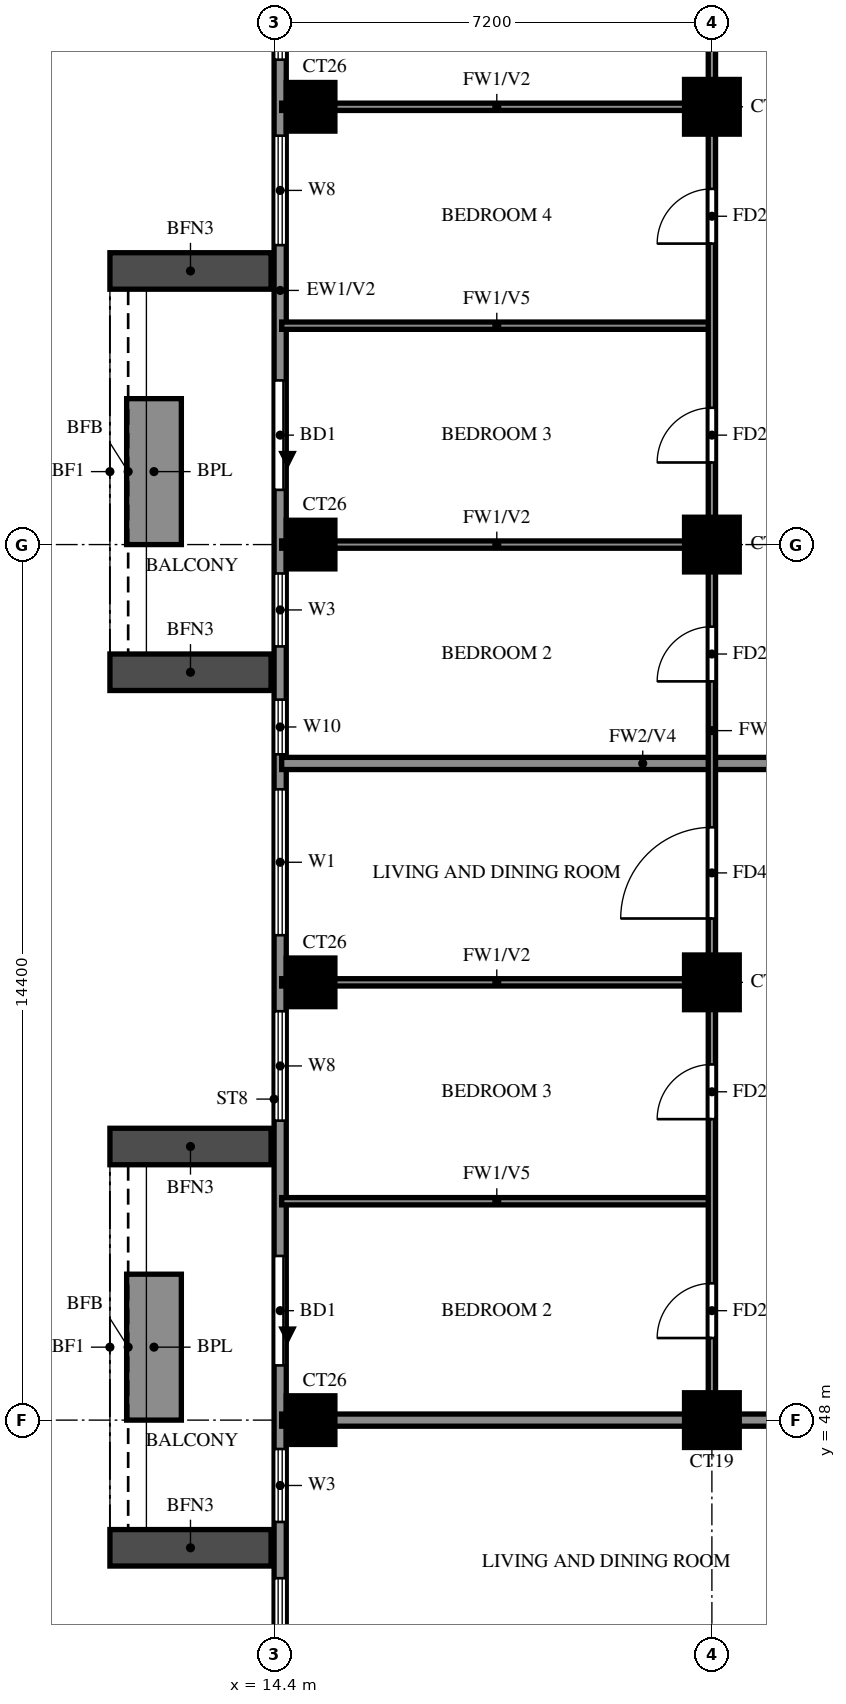
"""IFC4 building model, lengths in metres.
Left out: names, types, materials, properties, quantities, classifications, styles, units other than length and angle.
Written with IfcOpenShell. Run it as: python <this file> out.ifc"""

import sys

from ifc_helpers import new_model, si_unit, direction, frame, frame_2d, origin, origin_2d, place, context, subcontext, project, spatial, rectangle, extrude, source, transform, mapped, element, fill, save


model = new_model("IFC4")
c1 = context("Model", 3, precision=1e-05, world=origin(), true_north=direction((0.0, 1.0)))
c2 = subcontext(c1, "Body", "Model", "MODEL_VIEW")
j1 = project(units=[si_unit("LENGTHUNIT", "METRE"), si_unit("PLANEANGLEUNIT", "RADIAN")], contexts=[c1])
p1 = place(None, origin())
s1 = spatial("IfcSite", under=j1, at=p1, CompositionType="ELEMENT")
p2 = place(p1, origin())
s2 = spatial("IfcBuilding", under=s1, at=p2, CompositionType="ELEMENT")
p3 = place(p2, frame((0.0, 0.0, 192.0)))
s3 = spatial("IfcBuildingStorey", under=s2, at=p3, CompositionType="ELEMENT", Elevation=192.0)
m1 = source(origin(), c2, "Body", "SweptSolid", [
    extrude(rectangle(XDim=0.8, YDim=0.8, at=origin_2d()), origin(), (0.0, 0.0, 1.0), 3.2),
])
p4 = place(p3, frame((15.0, 48.0, 0.0), z_axis=(0.0, 0.0, 1.0), x_axis=(1.0, 0.0, 0.0)))
e1 = element("IfcColumn", 1, at=p4, inside=s3, PredefinedType="COLUMN", context=c2, shape_type="MappedRepresentation", body=[
    mapped(m1, transform((0.0, 0.0, 0.0))),
])
m2 = source(origin(), c2, "Body", "SweptSolid", [
    extrude(rectangle(XDim=0.9, YDim=0.9, at=origin_2d()), origin(), (0.0, 0.0, 1.0), 3.2),
])
p5 = place(p3, frame((21.6, 48.0, 0.0), z_axis=(0.0, 0.0, 1.0), x_axis=(1.0, 0.0, 0.0)))
e2 = element("IfcColumn", 2, at=p5, inside=s3, PredefinedType="COLUMN", context=c2, shape_type="MappedRepresentation", body=[
    mapped(m2, transform((0.0, 0.0, 0.0))),
])
p6 = place(p3, frame((15.0, 55.2, 0.0), z_axis=(0.0, 0.0, 1.0), x_axis=(1.0, 0.0, 0.0)))
e3 = element("IfcColumn", 3, at=p6, inside=s3, PredefinedType="COLUMN", context=c2, shape_type="MappedRepresentation", body=[
    mapped(m1, transform((0.0, 0.0, 0.0))),
])
p7 = place(p3, frame((21.6, 55.2, 0.0), z_axis=(0.0, 0.0, 1.0), x_axis=(1.0, 0.0, 0.0)))
e4 = element("IfcColumn", 4, at=p7, inside=s3, PredefinedType="COLUMN", context=c2, shape_type="MappedRepresentation", body=[
    mapped(m2, transform((0.0, 0.0, 0.0))),
])
p8 = place(p3, frame((15.0, 62.4, 0.0), z_axis=(0.0, 0.0, 1.0), x_axis=(1.0, 0.0, 0.0)))
e5 = element("IfcColumn", 5, at=p8, inside=s3, PredefinedType="COLUMN", context=c2, shape_type="MappedRepresentation", body=[
    mapped(m1, transform((0.0, 0.0, 0.0))),
])
p9 = place(p3, frame((21.6, 62.4, 0.0), z_axis=(0.0, 0.0, 1.0), x_axis=(1.0, 0.0, 0.0)))
e6 = element("IfcColumn", 6, at=p9, inside=s3, PredefinedType="COLUMN", context=c2, shape_type="MappedRepresentation", body=[
    mapped(m2, transform((0.0, 0.0, 0.0))),
])
p10 = place(p3, frame((15.0, 69.6, 0.0), z_axis=(0.0, 0.0, 1.0), x_axis=(1.0, 0.0, 0.0)))
e7 = element("IfcColumn", 7, at=p10, inside=s3, PredefinedType="COLUMN", context=c2, shape_type="MappedRepresentation", body=[
    mapped(m1, transform((0.0, 0.0, 0.0))),
])
p11 = place(p3, frame((21.6, 69.6, 0.0), z_axis=(0.0, 0.0, 1.0), x_axis=(1.0, 0.0, 0.0)))
e8 = element("IfcColumn", 8, at=p11, inside=s3, PredefinedType="COLUMN", context=c2, shape_type="MappedRepresentation", body=[
    mapped(m2, transform((0.0, 0.0, 0.0))),
])
p12 = place(p3, frame((14.5, 76.6, 0.0), z_axis=(0.0, 0.0, 1.0), x_axis=(0.0, -1.0, 0.0)))
e9 = element("IfcWall", 9, at=p12, inside=s3, PredefinedType="SOLIDWALL", context=c2, shape_type="SweptSolid", body=[
    extrude(rectangle(XDim=33.4, YDim=0.2, at=frame_2d((16.7, 0.0))), origin(), (0.0, 0.0, 1.0), 3.2),
])
p13 = place(p12, frame((11.5, 0.0, 0.0)))
e10 = element("IfcOpeningElement", 10, at=p13, cuts=e9, PredefinedType="OPENING", context=c2, shape_type="SweptSolid", body=[
    extrude(rectangle(XDim=1.8, YDim=2.4, at=frame_2d((0.9, 1.2))), frame((0.0, 0.11, 0.0), z_axis=(0.0, -1.0, 0.0), x_axis=(1.0, 0.0, 0.0)), (0.0, 0.0, 1.0), 0.22),
])
p14 = place(p12, frame((25.9, 0.0, 0.0)))
e11 = element("IfcOpeningElement", 11, at=p14, cuts=e9, PredefinedType="OPENING", context=c2, shape_type="SweptSolid", body=[
    extrude(rectangle(XDim=1.8, YDim=2.4, at=frame_2d((0.9, 1.2))), frame((0.0, 0.11, 0.0), z_axis=(0.0, -1.0, 0.0), x_axis=(1.0, 0.0, 0.0)), (0.0, 0.0, 1.0), 0.22),
])
p15 = place(p12, frame((29.075, 0.0, 0.6)))
e12 = element("IfcOpeningElement", 12, at=p15, cuts=e9, PredefinedType="OPENING", context=c2, shape_type="SweptSolid", body=[
    extrude(rectangle(XDim=1.2, YDim=2.4, at=frame_2d((0.6, 1.2))), frame((0.0, 0.11, 0.0), z_axis=(0.0, -1.0, 0.0), x_axis=(1.0, 0.0, 0.0)), (0.0, 0.0, 1.0), 0.22),
])
p16 = place(p12, frame((31.2, 0.0, 0.6)))
e13 = element("IfcOpeningElement", 13, at=p16, cuts=e9, PredefinedType="OPENING", context=c2, shape_type="SweptSolid", body=[
    extrude(rectangle(XDim=1.8, YDim=2.4, at=frame_2d((0.9, 1.2))), frame((0.0, 0.11, 0.0), z_axis=(0.0, -1.0, 0.0), x_axis=(1.0, 0.0, 0.0)), (0.0, 0.0, 1.0), 0.22),
])
p17 = place(p12, frame((21.875, 0.0, 0.6)))
e14 = element("IfcOpeningElement", 14, at=p17, cuts=e9, PredefinedType="OPENING", context=c2, shape_type="SweptSolid", body=[
    extrude(rectangle(XDim=1.8, YDim=2.4, at=frame_2d((0.9, 1.2))), frame((0.0, 0.11, 0.0), z_axis=(0.0, -1.0, 0.0), x_axis=(1.0, 0.0, 0.0)), (0.0, 0.0, 1.0), 0.22),
])
p18 = place(p12, frame((18.225, 0.0, 0.6)))
e15 = element("IfcOpeningElement", 15, at=p18, cuts=e9, PredefinedType="OPENING", context=c2, shape_type="SweptSolid", body=[
    extrude(rectangle(XDim=2.4, YDim=2.4, at=frame_2d((1.2, 1.2))), frame((0.0, 0.11, 0.0), z_axis=(0.0, -1.0, 0.0), x_axis=(1.0, 0.0, 0.0)), (0.0, 0.0, 1.0), 0.22),
])
p19 = place(p12, frame((14.675, 0.0, 0.6)))
e16 = element("IfcOpeningElement", 16, at=p19, cuts=e9, PredefinedType="OPENING", context=c2, shape_type="SweptSolid", body=[
    extrude(rectangle(XDim=1.2, YDim=2.4, at=frame_2d((0.6, 1.2))), frame((0.0, 0.11, 0.0), z_axis=(0.0, -1.0, 0.0), x_axis=(1.0, 0.0, 0.0)), (0.0, 0.0, 1.0), 0.22),
])
p20 = place(p12, frame((16.75, 0.0, 0.6)))
e17 = element("IfcOpeningElement", 17, at=p20, cuts=e9, PredefinedType="OPENING", context=c2, shape_type="SweptSolid", body=[
    extrude(rectangle(XDim=0.9, YDim=2.4, at=frame_2d((0.45, 1.2))), frame((0.0, 0.11, 0.0), z_axis=(0.0, -1.0, 0.0), x_axis=(1.0, 0.0, 0.0)), (0.0, 0.0, 1.0), 0.22),
])
p21 = place(p12, frame((7.475, 0.0, 0.6)))
e18 = element("IfcOpeningElement", 18, at=p21, cuts=e9, PredefinedType="OPENING", context=c2, shape_type="SweptSolid", body=[
    extrude(rectangle(XDim=1.8, YDim=2.4, at=frame_2d((0.9, 1.2))), frame((0.0, 0.11, 0.0), z_axis=(0.0, -1.0, 0.0), x_axis=(1.0, 0.0, 0.0)), (0.0, 0.0, 1.0), 0.22),
])
p22 = place(p12, frame((3.825, 0.0, 0.6)))
e19 = element("IfcOpeningElement", 19, at=p22, cuts=e9, PredefinedType="OPENING", context=c2, shape_type="SweptSolid", body=[
    extrude(rectangle(XDim=2.4, YDim=2.4, at=frame_2d((1.2, 1.2))), frame((0.0, 0.11, 0.0), z_axis=(0.0, -1.0, 0.0), x_axis=(1.0, 0.0, 0.0)), (0.0, 0.0, 1.0), 0.22),
])
p23 = place(p12, frame((0.6, 0.0, 0.6)))
e20 = element("IfcOpeningElement", 20, at=p23, cuts=e9, PredefinedType="OPENING", context=c2, shape_type="SweptSolid", body=[
    extrude(rectangle(XDim=2.4, YDim=2.4, at=frame_2d((1.2, 1.2))), frame((0.0, 0.11, 0.0), z_axis=(0.0, -1.0, 0.0), x_axis=(1.0, 0.0, 0.0)), (0.0, 0.0, 1.0), 0.22),
])
for number, where, z_axis, x_axis in (
    (21, (14.35, 66.9, 0.0), (0.0, 0.0, 1.0), (-1.0, 0.0, 0.0)),
    (22, (14.35, 60.3, 0.0), (0.0, 0.0, 1.0), (-1.0, 0.0, 0.0)),
):
    element("IfcWall", number, at=place(p3, frame(where, z_axis=z_axis, x_axis=x_axis)), inside=s3, PredefinedType="SOLIDWALL", context=c2, shape_type="SweptSolid", body=[
        extrude(rectangle(XDim=2.65, YDim=0.6, at=frame_2d((1.325, 0.0))), origin(), (0.0, 0.0, 1.0), 2.85),
    ])
p24 = place(p3, frame((12.425, 64.8, 0.0), z_axis=(0.0, 0.0, 1.0), x_axis=(0.0, -1.0, 0.0)))
e23 = element("IfcWall", 23, at=p24, inside=s3, PredefinedType="SOLIDWALL", context=c2, shape_type="SweptSolid", body=[
    extrude(rectangle(XDim=2.4, YDim=0.9, at=frame_2d((1.2, 0.0))), origin(), (0.0, 0.0, 1.0), 0.9),
])
for number, where, z_axis, x_axis in (
    (24, (14.35, 52.5, 0.0), (0.0, 0.0, 1.0), (-1.0, 0.0, 0.0)),
    (25, (14.35, 45.9, 0.0), (0.0, 0.0, 1.0), (-1.0, 0.0, 0.0)),
):
    element("IfcWall", number, at=place(p3, frame(where, z_axis=z_axis, x_axis=x_axis)), inside=s3, PredefinedType="SOLIDWALL", context=c2, shape_type="SweptSolid", body=[
        extrude(rectangle(XDim=2.65, YDim=0.6, at=frame_2d((1.325, 0.0))), origin(), (0.0, 0.0, 1.0), 2.85),
    ])
p25 = place(p3, frame((12.425, 50.4, 0.0), z_axis=(0.0, 0.0, 1.0), x_axis=(0.0, -1.0, 0.0)))
e26 = element("IfcWall", 26, at=p25, inside=s3, PredefinedType="SOLIDWALL", context=c2, shape_type="SweptSolid", body=[
    extrude(rectangle(XDim=2.4, YDim=0.9, at=frame_2d((1.2, 0.0))), origin(), (0.0, 0.0, 1.0), 0.9),
])
p26 = place(p3, frame((14.525, 48.0, 0.0), z_axis=(0.0, 0.0, 1.0), x_axis=(1.0, 0.0, 0.0)))
e27 = element("IfcWall", 27, at=p26, inside=s3, PredefinedType="SOLIDWALL", context=c2, shape_type="SweptSolid", body=[
    extrude(rectangle(XDim=19.075, YDim=0.2, at=frame_2d((9.538, 0.0))), origin(), (0.0, 0.0, 1.0), 3.2),
])
p27 = place(p3, frame((14.525, 58.8, 0.0), z_axis=(0.0, 0.0, 1.0), x_axis=(1.0, 0.0, 0.0)))
e28 = element("IfcWall", 28, at=p27, inside=s3, PredefinedType="SOLIDWALL", context=c2, shape_type="SweptSolid", body=[
    extrude(rectangle(XDim=11.875, YDim=0.2, at=frame_2d((5.938, 0.0))), origin(), (0.0, 0.0, 1.0), 2.3),
])
p28 = place(p3, frame((14.525, 51.6, 0.0), z_axis=(0.0, 0.0, 1.0), x_axis=(1.0, 0.0, 0.0)))
e29 = element("IfcWall", 29, at=p28, inside=s3, PredefinedType="PARTITIONING", context=c2, shape_type="SweptSolid", body=[
    extrude(rectangle(XDim=7.075, YDim=0.12, at=frame_2d((3.538, 0.0))), origin(), (0.0, 0.0, 1.0), 2.3),
])
for number, where, z_axis, x_axis in (
    (30, (14.525, 55.2, 0.0), (0.0, 0.0, 1.0), (1.0, 0.0, 0.0)),
    (31, (14.525, 62.4, 0.0), (0.0, 0.0, 1.0), (1.0, 0.0, 0.0)),
):
    element("IfcWall", number, at=place(p3, frame(where, z_axis=z_axis, x_axis=x_axis)), inside=s3, PredefinedType="PARTITIONING", context=c2, shape_type="SweptSolid", body=[
        extrude(rectangle(XDim=7.075, YDim=0.12, at=frame_2d((3.538, 0.0))), origin(), (0.0, 0.0, 1.0), 3.2),
    ])
p29 = place(p3, frame((14.525, 66.0, 0.0), z_axis=(0.0, 0.0, 1.0), x_axis=(1.0, 0.0, 0.0)))
e32 = element("IfcWall", 32, at=p29, inside=s3, PredefinedType="PARTITIONING", context=c2, shape_type="SweptSolid", body=[
    extrude(rectangle(XDim=7.075, YDim=0.12, at=frame_2d((3.538, 0.0))), origin(), (0.0, 0.0, 1.0), 2.3),
])
p30 = place(p3, frame((14.525, 69.6, 0.0), z_axis=(0.0, 0.0, 1.0), x_axis=(1.0, 0.0, 0.0)))
e33 = element("IfcWall", 33, at=p30, inside=s3, PredefinedType="PARTITIONING", context=c2, shape_type="SweptSolid", body=[
    extrude(rectangle(XDim=7.075, YDim=0.12, at=frame_2d((3.538, 0.0))), origin(), (0.0, 0.0, 1.0), 3.2),
])
p31 = place(p3, frame((21.6, 48.0, 0.0), z_axis=(0.0, 0.0, 1.0), x_axis=(0.0, 1.0, 0.0)))
e34 = element("IfcWall", 34, at=p31, inside=s3, PredefinedType="PARTITIONING", context=c2, shape_type="SweptSolid", body=[
    extrude(rectangle(XDim=25.2, YDim=0.12, at=frame_2d((12.6, 0.0))), origin(), (0.0, 0.0, 1.0), 3.2),
])
p32 = place(p31, frame((1.35, 0.0, 0.0)))
e35 = element("IfcOpeningElement", 35, at=p32, cuts=e34, PredefinedType="OPENING", context=c2, shape_type="SweptSolid", body=[
    extrude(rectangle(XDim=0.9, YDim=2.1, at=frame_2d((0.45, 1.05))), frame((0.0, 0.07, 0.0), z_axis=(0.0, -1.0, 0.0), x_axis=(1.0, 0.0, 0.0)), (0.0, 0.0, 1.0), 0.14),
])
p33 = place(p31, frame((4.95, 0.0, 0.0)))
e36 = element("IfcOpeningElement", 36, at=p33, cuts=e34, PredefinedType="OPENING", context=c2, shape_type="SweptSolid", body=[
    extrude(rectangle(XDim=0.9, YDim=2.1, at=frame_2d((0.45, 1.05))), frame((0.0, 0.07, 0.0), z_axis=(0.0, -1.0, 0.0), x_axis=(1.0, 0.0, 0.0)), (0.0, 0.0, 1.0), 0.14),
])
p34 = place(p31, frame((8.25, 0.0, 0.0)))
e37 = element("IfcOpeningElement", 37, at=p34, cuts=e34, PredefinedType="OPENING", context=c2, shape_type="SweptSolid", body=[
    extrude(rectangle(XDim=1.5, YDim=2.1, at=frame_2d((0.75, 1.05))), frame((0.0, 0.07, 0.0), z_axis=(0.0, -1.0, 0.0), x_axis=(1.0, 0.0, 0.0)), (0.0, 0.0, 1.0), 0.14),
])
p35 = place(p31, frame((12.15, 0.0, 0.0)))
e38 = element("IfcOpeningElement", 38, at=p35, cuts=e34, PredefinedType="OPENING", context=c2, shape_type="SweptSolid", body=[
    extrude(rectangle(XDim=0.9, YDim=2.1, at=frame_2d((0.45, 1.05))), frame((0.0, 0.07, 0.0), z_axis=(0.0, -1.0, 0.0), x_axis=(1.0, 0.0, 0.0)), (0.0, 0.0, 1.0), 0.14),
])
p36 = place(p31, frame((15.75, 0.0, 0.0)))
e39 = element("IfcOpeningElement", 39, at=p36, cuts=e34, PredefinedType="OPENING", context=c2, shape_type="SweptSolid", body=[
    extrude(rectangle(XDim=0.9, YDim=2.1, at=frame_2d((0.45, 1.05))), frame((0.0, 0.07, 0.0), z_axis=(0.0, -1.0, 0.0), x_axis=(1.0, 0.0, 0.0)), (0.0, 0.0, 1.0), 0.14),
])
p37 = place(p31, frame((19.35, 0.0, 0.0)))
e40 = element("IfcOpeningElement", 40, at=p37, cuts=e34, PredefinedType="OPENING", context=c2, shape_type="SweptSolid", body=[
    extrude(rectangle(XDim=0.9, YDim=2.1, at=frame_2d((0.45, 1.05))), frame((0.0, 0.07, 0.0), z_axis=(0.0, -1.0, 0.0), x_axis=(1.0, 0.0, 0.0)), (0.0, 0.0, 1.0), 0.14),
])
p38 = place(p31, frame((22.95, 0.0, 0.0)))
e41 = element("IfcOpeningElement", 41, at=p38, cuts=e34, PredefinedType="OPENING", context=c2, shape_type="SweptSolid", body=[
    extrude(rectangle(XDim=0.9, YDim=2.1, at=frame_2d((0.45, 1.05))), frame((0.0, 0.07, 0.0), z_axis=(0.0, -1.0, 0.0), x_axis=(1.0, 0.0, 0.0)), (0.0, 0.0, 1.0), 0.14),
])
p39 = place(p13, origin())
e42 = element("IfcDoor", 42, at=p39, inside=s3, OperationType="DOUBLE_DOOR_SLIDING", PredefinedType="DOOR", context=c2, shape_type="SweptSolid", body=[
    extrude(rectangle(XDim=1.8, YDim=2.4, at=frame_2d((0.9, 1.2))), frame((0.0, 0.025, 0.0), z_axis=(0.0, -1.0, 0.0), x_axis=(1.0, 0.0, 0.0)), (0.0, 0.0, 1.0), 0.05),
])
fill(e10, e42)
p40 = place(p14, origin())
e43 = element("IfcDoor", 43, at=p40, inside=s3, OperationType="DOUBLE_DOOR_SLIDING", PredefinedType="DOOR", context=c2, shape_type="SweptSolid", body=[
    extrude(rectangle(XDim=1.8, YDim=2.4, at=frame_2d((0.9, 1.2))), frame((0.0, 0.025, 0.0), z_axis=(0.0, -1.0, 0.0), x_axis=(1.0, 0.0, 0.0)), (0.0, 0.0, 1.0), 0.05),
])
fill(e11, e43)
p41 = place(p15, origin())
e44 = element("IfcWindow", 44, at=p41, inside=s3, PartitioningType="SINGLE_PANEL", PredefinedType="WINDOW", context=c2, shape_type="SweptSolid", body=[
    extrude(rectangle(XDim=1.2, YDim=2.4, at=frame_2d((0.6, 1.2))), frame((0.0, 0.03, 0.0), z_axis=(0.0, -1.0, 0.0), x_axis=(1.0, 0.0, 0.0)), (0.0, 0.0, 1.0), 0.06),
])
fill(e12, e44)
p42 = place(p16, origin())
e45 = element("IfcWindow", 45, at=p42, inside=s3, PartitioningType="DOUBLE_PANEL_VERTICAL", PredefinedType="WINDOW", context=c2, shape_type="SweptSolid", body=[
    extrude(rectangle(XDim=1.8, YDim=2.4, at=frame_2d((0.9, 1.2))), frame((0.0, 0.03, 0.0), z_axis=(0.0, -1.0, 0.0), x_axis=(1.0, 0.0, 0.0)), (0.0, 0.0, 1.0), 0.06),
])
fill(e13, e45)
p43 = place(p17, origin())
e46 = element("IfcWindow", 46, at=p43, inside=s3, PartitioningType="DOUBLE_PANEL_VERTICAL", PredefinedType="WINDOW", context=c2, shape_type="SweptSolid", body=[
    extrude(rectangle(XDim=1.8, YDim=2.4, at=frame_2d((0.9, 1.2))), frame((0.0, 0.03, 0.0), z_axis=(0.0, -1.0, 0.0), x_axis=(1.0, 0.0, 0.0)), (0.0, 0.0, 1.0), 0.06),
])
fill(e14, e46)
p44 = place(p18, origin())
e47 = element("IfcWindow", 47, at=p44, inside=s3, PartitioningType="DOUBLE_PANEL_VERTICAL", PredefinedType="WINDOW", context=c2, shape_type="SweptSolid", body=[
    extrude(rectangle(XDim=2.4, YDim=2.4, at=frame_2d((1.2, 1.2))), frame((0.0, 0.03, 0.0), z_axis=(0.0, -1.0, 0.0), x_axis=(1.0, 0.0, 0.0)), (0.0, 0.0, 1.0), 0.06),
])
fill(e15, e47)
p45 = place(p19, origin())
e48 = element("IfcWindow", 48, at=p45, inside=s3, PartitioningType="SINGLE_PANEL", PredefinedType="WINDOW", context=c2, shape_type="SweptSolid", body=[
    extrude(rectangle(XDim=1.2, YDim=2.4, at=frame_2d((0.6, 1.2))), frame((0.0, 0.03, 0.0), z_axis=(0.0, -1.0, 0.0), x_axis=(1.0, 0.0, 0.0)), (0.0, 0.0, 1.0), 0.06),
])
fill(e16, e48)
p46 = place(p20, origin())
e49 = element("IfcWindow", 49, at=p46, inside=s3, PartitioningType="SINGLE_PANEL", PredefinedType="WINDOW", context=c2, shape_type="SweptSolid", body=[
    extrude(rectangle(XDim=0.9, YDim=2.4, at=frame_2d((0.45, 1.2))), frame((0.0, 0.03, 0.0), z_axis=(0.0, -1.0, 0.0), x_axis=(1.0, 0.0, 0.0)), (0.0, 0.0, 1.0), 0.06),
])
fill(e17, e49)
p47 = place(p21, origin())
e50 = element("IfcWindow", 50, at=p47, inside=s3, PartitioningType="DOUBLE_PANEL_VERTICAL", PredefinedType="WINDOW", context=c2, shape_type="SweptSolid", body=[
    extrude(rectangle(XDim=1.8, YDim=2.4, at=frame_2d((0.9, 1.2))), frame((0.0, 0.03, 0.0), z_axis=(0.0, -1.0, 0.0), x_axis=(1.0, 0.0, 0.0)), (0.0, 0.0, 1.0), 0.06),
])
fill(e18, e50)
p48 = place(p22, origin())
e51 = element("IfcWindow", 51, at=p48, inside=s3, PartitioningType="DOUBLE_PANEL_VERTICAL", PredefinedType="WINDOW", context=c2, shape_type="SweptSolid", body=[
    extrude(rectangle(XDim=2.4, YDim=2.4, at=frame_2d((1.2, 1.2))), frame((0.0, 0.03, 0.0), z_axis=(0.0, -1.0, 0.0), x_axis=(1.0, 0.0, 0.0)), (0.0, 0.0, 1.0), 0.06),
])
fill(e19, e51)
p49 = place(p32, origin())
e52 = element("IfcDoor", 52, at=p49, inside=s3, OperationType="SINGLE_SWING_LEFT", PredefinedType="DOOR", context=c2, shape_type="SweptSolid", body=[
    extrude(rectangle(XDim=0.9, YDim=2.1, at=frame_2d((0.45, 1.05))), frame((0.0, 0.025, 0.0), z_axis=(0.0, -1.0, 0.0), x_axis=(1.0, 0.0, 0.0)), (0.0, 0.0, 1.0), 0.05),
])
fill(e35, e52)
p50 = place(p33, origin())
e53 = element("IfcDoor", 53, at=p50, inside=s3, OperationType="SINGLE_SWING_RIGHT", PredefinedType="DOOR", context=c2, shape_type="SweptSolid", body=[
    extrude(rectangle(XDim=0.9, YDim=2.1, at=frame_2d((0.45, 1.05))), frame((0.0, 0.025, 0.0), z_axis=(0.0, -1.0, 0.0), x_axis=(1.0, 0.0, 0.0)), (0.0, 0.0, 1.0), 0.05),
])
fill(e36, e53)
p51 = place(p34, origin())
e54 = element("IfcDoor", 54, at=p51, inside=s3, OperationType="SINGLE_SWING_LEFT", PredefinedType="DOOR", context=c2, shape_type="SweptSolid", body=[
    extrude(rectangle(XDim=1.5, YDim=2.1, at=frame_2d((0.75, 1.05))), frame((0.0, 0.025, 0.0), z_axis=(0.0, -1.0, 0.0), x_axis=(1.0, 0.0, 0.0)), (0.0, 0.0, 1.0), 0.05),
])
fill(e37, e54)
p52 = place(p35, origin())
e55 = element("IfcDoor", 55, at=p52, inside=s3, OperationType="SINGLE_SWING_LEFT", PredefinedType="DOOR", context=c2, shape_type="SweptSolid", body=[
    extrude(rectangle(XDim=0.9, YDim=2.1, at=frame_2d((0.45, 1.05))), frame((0.0, 0.025, 0.0), z_axis=(0.0, -1.0, 0.0), x_axis=(1.0, 0.0, 0.0)), (0.0, 0.0, 1.0), 0.05),
])
fill(e38, e55)
p53 = place(p36, origin())
e56 = element("IfcDoor", 56, at=p53, inside=s3, OperationType="SINGLE_SWING_LEFT", PredefinedType="DOOR", context=c2, shape_type="SweptSolid", body=[
    extrude(rectangle(XDim=0.9, YDim=2.1, at=frame_2d((0.45, 1.05))), frame((0.0, 0.025, 0.0), z_axis=(0.0, -1.0, 0.0), x_axis=(1.0, 0.0, 0.0)), (0.0, 0.0, 1.0), 0.05),
])
fill(e39, e56)
p54 = place(p37, origin())
e57 = element("IfcDoor", 57, at=p54, inside=s3, OperationType="SINGLE_SWING_RIGHT", PredefinedType="DOOR", context=c2, shape_type="SweptSolid", body=[
    extrude(rectangle(XDim=0.9, YDim=2.1, at=frame_2d((0.45, 1.05))), frame((0.0, 0.025, 0.0), z_axis=(0.0, -1.0, 0.0), x_axis=(1.0, 0.0, 0.0)), (0.0, 0.0, 1.0), 0.05),
])
fill(e40, e57)
save(model, sys.argv[1])
